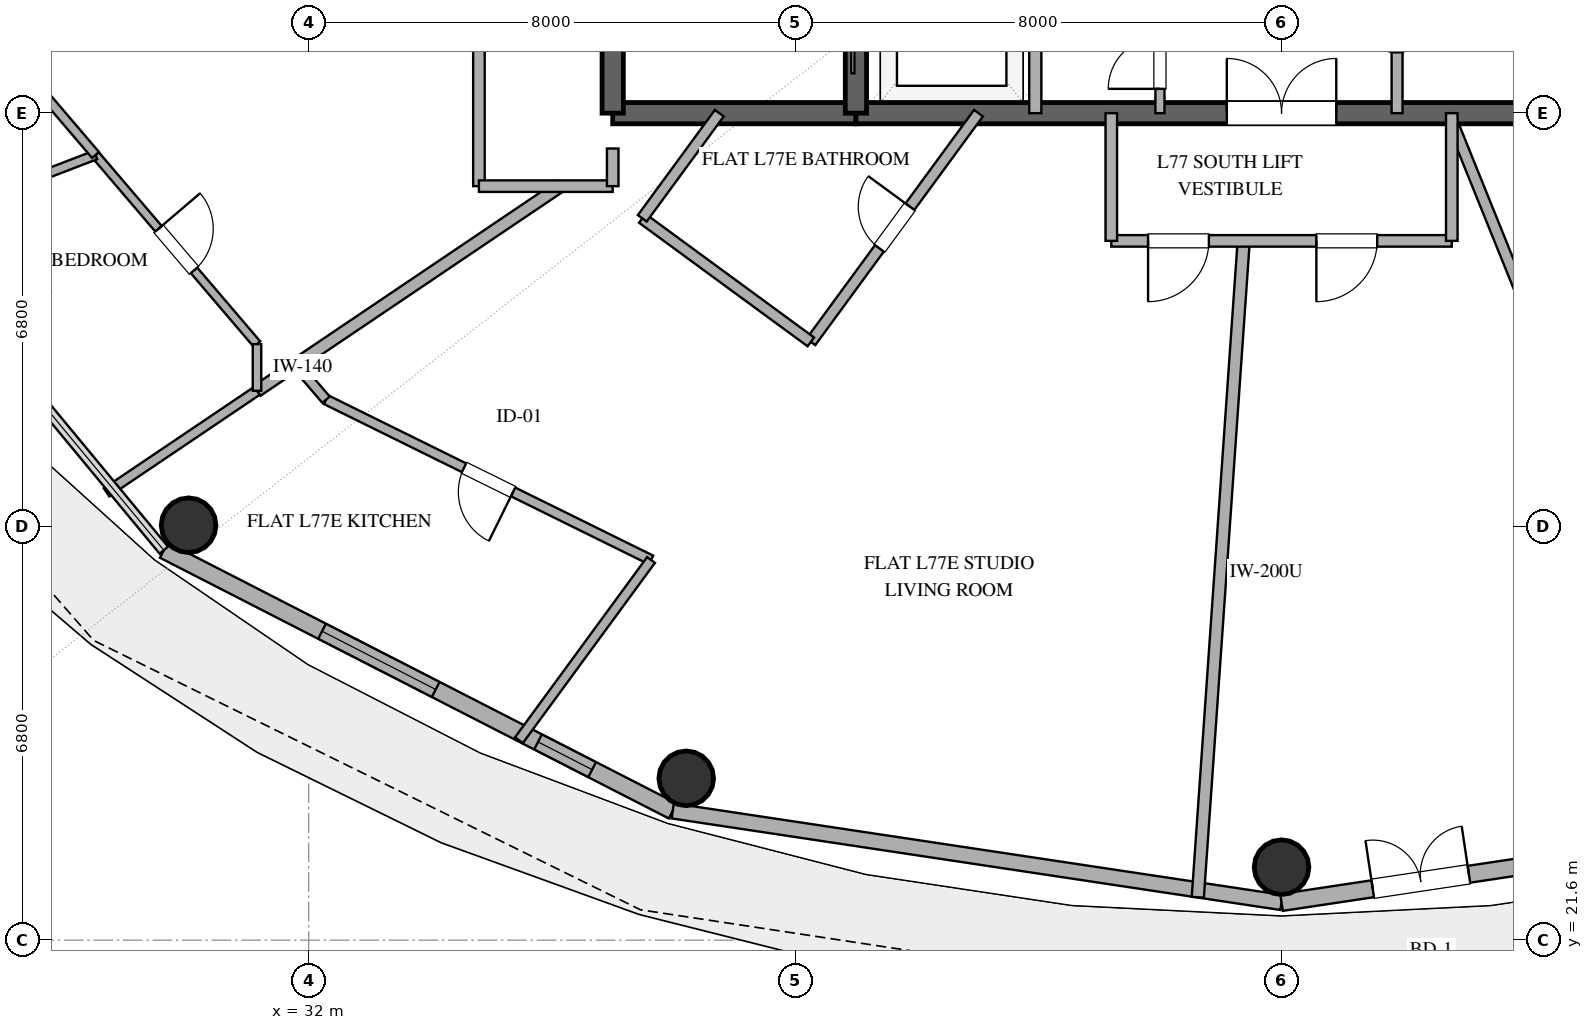
"""IFC4 building model, lengths in metres.
Left out: names, types, materials, properties, quantities, classifications, styles, units other than length and angle.
Written with IfcOpenShell. Run it as: python <this file> out.ifc"""

import sys

from ifc_helpers import new_model, si_unit, direction, frame, frame_2d, origin, origin_2d, place, context, subcontext, project, spatial, rectangle, hollow_circle, extrude, element, fill, save


model = new_model("IFC4")
c1 = context("Model", 3, precision=1e-05, world=origin(), true_north=direction((0.0, 1.0)))
c2 = subcontext(c1, "Body", "Model", "MODEL_VIEW")
j1 = project(units=[si_unit("LENGTHUNIT", "METRE"), si_unit("PLANEANGLEUNIT", "RADIAN")], contexts=[c1])
p1 = place(None, origin())
s1 = spatial("IfcSite", under=j1, at=p1, CompositionType="ELEMENT")
p2 = place(p1, origin())
s2 = spatial("IfcBuilding", under=s1, at=p2, CompositionType="ELEMENT")
p3 = place(p2, frame((0.0, 0.0, 298.2)))
s3 = spatial("IfcBuildingStorey", under=s2, at=p3, CompositionType="ELEMENT", Elevation=298.2)
p4 = place(p3, frame((37.0, 35.2, 0.0), z_axis=(0.0, 0.0, 1.0), x_axis=(1.0, 0.0, 0.0)))
e1 = element("IfcWall", 1, at=p4, inside=s3, PredefinedType="SHEAR", context=c2, shape_type="SweptSolid", body=[
    extrude(rectangle(XDim=4.0, YDim=0.35, at=frame_2d((2.0, 0.0))), origin(), (0.0, 0.0, 1.0), 3.37),
])
p5 = place(p3, frame((41.0, 35.2, 0.0), z_axis=(0.0, 0.0, 1.0), x_axis=(1.0, 0.0, 0.0)))
e2 = element("IfcWall", 2, at=p5, inside=s3, PredefinedType="SHEAR", context=c2, shape_type="SweptSolid", body=[
    extrude(rectangle(XDim=14.0, YDim=0.35, at=frame_2d((7.0, 0.0))), origin(), (0.0, 0.0, 1.0), 3.37),
])
p6 = place(p5, frame((6.1, 0.0, 0.0)))
e3 = element("IfcOpeningElement", 3, at=p6, cuts=e2, PredefinedType="OPENING", context=c2, shape_type="SweptSolid", body=[
    extrude(rectangle(XDim=1.8, YDim=2.25, at=frame_2d((0.9, 1.125))), frame((0.0, 0.185, 0.0), z_axis=(0.0, -1.0, 0.0), x_axis=(1.0, 0.0, 0.0)), (0.0, 0.0, 1.0), 0.37),
])
p7 = place(p3, frame((37.0, 35.2, 0.0), z_axis=(0.0, 0.0, 1.0), x_axis=(0.0, 1.0, 0.0)))
e4 = element("IfcWall", 4, at=p7, inside=s3, PredefinedType="SHEAR", context=c2, shape_type="SweptSolid", body=[
    extrude(rectangle(XDim=13.6, YDim=0.35, at=frame_2d((6.8, 0.0))), origin(), (0.0, 0.0, 1.0), 3.37),
])
p8 = place(p7, frame((1.5, 0.0, 0.0)))
e5 = element("IfcOpeningElement", 5, at=p8, cuts=e4, PredefinedType="OPENING", context=c2, shape_type="SweptSolid", body=[
    extrude(rectangle(XDim=1.2, YDim=2.15, at=frame_2d((0.6, 1.075))), frame((0.0, 0.185, 0.0), z_axis=(0.0, -1.0, 0.0), x_axis=(1.0, 0.0, 0.0)), (0.0, 0.0, 1.0), 0.37),
])
p9 = place(p3, frame((41.0, 35.2, 0.0), z_axis=(0.0, 0.0, 1.0), x_axis=(0.0, 1.0, 0.0)))
e6 = element("IfcWall", 6, at=p9, inside=s3, PredefinedType="SHEAR", context=c2, shape_type="SweptSolid", body=[
    extrude(rectangle(XDim=13.6, YDim=0.35, at=frame_2d((6.8, 0.0))), origin(), (0.0, 0.0, 1.0), 3.37),
])
p10 = place(p9, frame((1.15, 0.0, 0.0)))
e7 = element("IfcOpeningElement", 7, at=p10, cuts=e6, PredefinedType="OPENING", context=c2, shape_type="SweptSolid", body=[
    extrude(rectangle(XDim=1.1, YDim=2.2, at=frame_2d((0.55, 1.1))), frame((0.0, 0.185, 0.0), z_axis=(0.0, -1.0, 0.0), x_axis=(1.0, 0.0, 0.0)), (0.0, 0.0, 1.0), 0.37),
])
for number, where, z_axis, x_axis in (
    (8, (30.025, 28.424, 0.0), (0.0, 0.0, 1.0), (1.0, 0.0, 0.0)),
    (9, (38.209, 24.261, 0.0), (0.0, 0.0, 1.0), (1.0, 0.0, 0.0)),
    (10, (48.0, 22.8, 0.0), (0.0, 0.0, 1.0), (1.0, 0.0, 0.0)),
):
    element("IfcColumn", number, at=place(p3, frame(where, z_axis=z_axis, x_axis=x_axis)), inside=s3, PredefinedType="COLUMN", context=c2, shape_type="SweptSolid", body=[
        extrude(hollow_circle(Radius=0.45, WallThickness=0.025, at=origin_2d()), origin(), (0.0, 0.0, 1.0), 3.37),
    ])
p11 = place(p3, frame((29.617, 28.013, 0.0), z_axis=(0.0, 0.0, 1.0), x_axis=(0.890007394051, -0.455946091699, 0.0)))
e11 = element("IfcWall", 11, at=p11, inside=s3, PredefinedType="SOLIDWALL", context=c2, shape_type="SweptSolid", body=[
    extrude(rectangle(XDim=9.404, YDim=0.28, at=frame_2d((4.702, 0.0))), origin(), (0.0, 0.0, 1.0), 3.37),
])
p12 = place(p11, frame((2.924, 0.0, 0.85)))
e12 = element("IfcOpeningElement", 12, at=p12, cuts=e11, PredefinedType="OPENING", context=c2, shape_type="SweptSolid", body=[
    extrude(rectangle(XDim=2.1, YDim=2.2, at=frame_2d((1.05, 1.1))), frame((0.0, 0.15, 0.0), z_axis=(0.0, -1.0, 0.0), x_axis=(1.0, 0.0, 0.0)), (0.0, 0.0, 1.0), 0.3),
])
p13 = place(p11, frame((6.915, 0.0, 0.85)))
e13 = element("IfcOpeningElement", 13, at=p13, cuts=e11, PredefinedType="OPENING", context=c2, shape_type="SweptSolid", body=[
    extrude(rectangle(XDim=1.0, YDim=1.8, at=frame_2d((0.5, 0.9))), frame((0.0, 0.15, 0.0), z_axis=(0.0, -1.0, 0.0), x_axis=(1.0, 0.0, 0.0)), (0.0, 0.0, 1.0), 0.3),
])
p14 = place(p3, frame((37.987, 23.726, 0.0), z_axis=(0.0, 0.0, 1.0), x_axis=(0.988882522213, -0.148698881169, 0.0)))
e14 = element("IfcWall", 14, at=p14, inside=s3, PredefinedType="SOLIDWALL", context=c2, shape_type="SweptSolid", body=[
    extrude(rectangle(XDim=10.125, YDim=0.25, at=frame_2d((5.062, 0.0))), origin(), (0.0, 0.0, 1.0), 3.37),
])
p15 = place(p3, frame((48.0, 22.22, 0.0), z_axis=(0.0, 0.0, 1.0), x_axis=(0.988882522213, 0.148698881169, 0.0)))
e15 = element("IfcWall", 15, at=p15, inside=s3, PredefinedType="SOLIDWALL", context=c2, shape_type="SweptSolid", body=[
    extrude(rectangle(XDim=10.125, YDim=0.28, at=frame_2d((5.062, 0.0))), origin(), (0.0, 0.0, 1.0), 3.37),
])
p16 = place(p15, frame((1.516, 0.0, 0.0)))
e16 = element("IfcOpeningElement", 16, at=p16, cuts=e15, PredefinedType="OPENING", context=c2, shape_type="SweptSolid", body=[
    extrude(rectangle(XDim=1.6, YDim=2.25, at=frame_2d((0.8, 1.125))), frame((0.0, 0.15, 0.0), z_axis=(0.0, -1.0, 0.0), x_axis=(1.0, 0.0, 0.0)), (0.0, 0.0, 1.0), 0.3),
])
p17 = place(p15, frame((6.169, 0.0, 0.85)))
e17 = element("IfcOpeningElement", 17, at=p17, cuts=e15, PredefinedType="OPENING", context=c2, shape_type="SweptSolid", body=[
    extrude(rectangle(XDim=1.5, YDim=2.0, at=frame_2d((0.75, 1.0))), frame((0.0, 0.15, 0.0), z_axis=(0.0, -1.0, 0.0), x_axis=(1.0, 0.0, 0.0)), (0.0, 0.0, 1.0), 0.3),
])
p18 = place(p3, frame((43.95, 35.2, 0.0), z_axis=(0.0, 0.0, 1.0), x_axis=(0.0, 1.0, 0.0)))
e18 = element("IfcWall", 18, at=p18, inside=s3, PredefinedType="SOLIDWALL", context=c2, shape_type="SweptSolid", body=[
    extrude(rectangle(XDim=3.2, YDim=0.2, at=frame_2d((1.6, 0.0))), origin(), (0.0, 0.0, 1.0), 2.73),
])
p19 = place(p3, frame((46.0, 35.2, 0.0), z_axis=(0.0, 0.0, 1.0), x_axis=(0.0, 1.0, 0.0)))
e19 = element("IfcWall", 19, at=p19, inside=s3, PredefinedType="PARTITIONING", context=c2, shape_type="SweptSolid", body=[
    extrude(rectangle(XDim=3.2, YDim=0.15, at=frame_2d((1.6, 0.0))), origin(), (0.0, 0.0, 1.0), 2.73),
])
p20 = place(p19, frame((0.4, 0.0, 0.0)))
e20 = element("IfcOpeningElement", 20, at=p20, cuts=e19, PredefinedType="OPENING", context=c2, shape_type="SweptSolid", body=[
    extrude(rectangle(XDim=0.85, YDim=2.15, at=frame_2d((0.425, 1.075))), frame((0.0, 0.085, 0.0), z_axis=(0.0, -1.0, 0.0), x_axis=(1.0, 0.0, 0.0)), (0.0, 0.0, 1.0), 0.17),
])
p21 = place(p19, frame((1.85, 0.0, 0.0)))
e21 = element("IfcOpeningElement", 21, at=p21, cuts=e19, PredefinedType="OPENING", context=c2, shape_type="SweptSolid", body=[
    extrude(rectangle(XDim=0.85, YDim=2.15, at=frame_2d((0.425, 1.075))), frame((0.0, 0.085, 0.0), z_axis=(0.0, -1.0, 0.0), x_axis=(1.0, 0.0, 0.0)), (0.0, 0.0, 1.0), 0.17),
])
p22 = place(p3, frame((49.9, 35.2, 0.0), z_axis=(0.0, 0.0, 1.0), x_axis=(0.0, 1.0, 0.0)))
e22 = element("IfcWall", 22, at=p22, inside=s3, PredefinedType="PLUMBINGWALL", context=c2, shape_type="SweptSolid", body=[
    extrude(rectangle(XDim=3.0, YDim=0.18, at=frame_2d((1.5, 0.0))), origin(), (0.0, 0.0, 1.0), 2.73),
])
p23 = place(p22, frame((1.0, 0.0, 0.0)))
e23 = element("IfcOpeningElement", 23, at=p23, cuts=e22, PredefinedType="OPENING", context=c2, shape_type="SweptSolid", body=[
    extrude(rectangle(XDim=0.9, YDim=2.1, at=frame_2d((0.45, 1.05))), frame((0.0, 0.1, 0.0), z_axis=(0.0, -1.0, 0.0), x_axis=(1.0, 0.0, 0.0)), (0.0, 0.0, 1.0), 0.2),
])
p24 = place(p3, frame((47.378, 33.1, 0.0), z_axis=(0.0, 0.0, 1.0), x_axis=(-0.069765360577, -0.997563428792, 0.0)))
e24 = element("IfcWall", 24, at=p24, inside=s3, PredefinedType="PARTITIONING", context=c2, shape_type="SweptSolid", body=[
    extrude(rectangle(XDim=10.82, YDim=0.2, at=frame_2d((5.41, 0.0))), origin(), (0.0, 0.0, 1.0), 2.73),
])
p25 = place(p3, frame((34.8, 34.0, 0.0), z_axis=(0.0, 0.0, 1.0), x_axis=(0.0, 1.0, 0.0)))
e25 = element("IfcWall", 25, at=p25, inside=s3, PredefinedType="PARTITIONING", context=c2, shape_type="SweptSolid", body=[
    extrude(rectangle(XDim=12.323, YDim=0.19, at=frame_2d((6.161, 0.0))), origin(), (0.0, 0.0, 1.0), 2.73),
])
p26 = place(p25, frame((4.849, 0.0, 0.0)))
e26 = element("IfcOpeningElement", 26, at=p26, cuts=e25, PredefinedType="OPENING", context=c2, shape_type="SweptSolid", body=[
    extrude(rectangle(XDim=1.0, YDim=2.2, at=frame_2d((0.5, 1.1))), frame((0.0, 0.105, 0.0), z_axis=(0.0, -1.0, 0.0), x_axis=(1.0, 0.0, 0.0)), (0.0, 0.0, 1.0), 0.21),
])
p27 = place(p3, frame((50.8, 35.07, 0.0), z_axis=(0.0, 0.0, 1.0), x_axis=(0.374600990238, -0.927186118378, 0.0)))
e27 = element("IfcWall", 27, at=p27, inside=s3, PredefinedType="PLUMBINGWALL", context=c2, shape_type="SweptSolid", body=[
    extrude(rectangle(XDim=7.901, YDim=0.18, at=frame_2d((3.95, 0.0))), origin(), (0.0, 0.0, 1.0), 2.73),
])
p28 = place(p3, frame((37.63, 27.852, 0.0), z_axis=(0.0, 0.0, 1.0), x_axis=(-0.896847493932, 0.442339883605, 0.0)))
e28 = element("IfcWall", 28, at=p28, inside=s3, PredefinedType="PLUMBINGWALL", context=c2, shape_type="SweptSolid", body=[
    extrude(rectangle(XDim=5.959, YDim=0.16, at=frame_2d((2.979, 0.0))), origin(), (0.0, 0.0, 1.0), 2.73),
])
p29 = place(p28, frame((2.53, 0.0, 0.0)))
e29 = element("IfcOpeningElement", 29, at=p29, cuts=e28, PredefinedType="OPENING", context=c2, shape_type="SweptSolid", body=[
    extrude(rectangle(XDim=0.9, YDim=2.1, at=frame_2d((0.45, 1.05))), frame((0.0, 0.09, 0.0), z_axis=(0.0, -1.0, 0.0), x_axis=(1.0, 0.0, 0.0)), (0.0, 0.0, 1.0), 0.18),
])
p30 = place(p3, frame((31.15, 30.635, 0.0), z_axis=(0.0, 0.0, 1.0), x_axis=(0.829036266652, 0.559194839546, 0.0)))
e30 = element("IfcWall", 30, at=p30, inside=s3, PredefinedType="PARTITIONING", context=c2, shape_type="SweptSolid", body=[
    extrude(rectangle(XDim=6.019, YDim=0.2, at=frame_2d((3.009, 0.0))), origin(), (0.0, 0.0, 1.0), 2.73),
])
p31 = place(p3, frame((40.259, 31.439, 0.0), z_axis=(0.0, 0.0, 1.0), x_axis=(0.591168457908, 0.806548110391, 0.0)))
e31 = element("IfcWall", 31, at=p31, inside=s3, PredefinedType="PLUMBINGWALL", context=c2, shape_type="SweptSolid", body=[
    extrude(rectangle(XDim=4.663, YDim=0.18, at=frame_2d((2.332, 0.0))), origin(), (0.0, 0.0, 1.0), 2.73),
])
p32 = place(p31, frame((1.907, 0.0, 0.0)))
e32 = element("IfcOpeningElement", 32, at=p32, cuts=e31, PredefinedType="OPENING", context=c2, shape_type="SweptSolid", body=[
    extrude(rectangle(XDim=0.85, YDim=2.1, at=frame_2d((0.425, 1.05))), frame((0.0, 0.1, 0.0), z_axis=(0.0, -1.0, 0.0), x_axis=(1.0, 0.0, 0.0)), (0.0, 0.0, 1.0), 0.2),
])
p33 = place(p3, frame((28.494, 34.512, 0.0), z_axis=(0.0, 0.0, 1.0), x_axis=(0.649192484668, -0.760624163336, 0.0)))
e33 = element("IfcWall", 33, at=p33, inside=s3, PredefinedType="PARTITIONING", context=c2, shape_type="SweptSolid", body=[
    extrude(rectangle(XDim=4.091, YDim=0.14, at=frame_2d((2.045, 0.0))), origin(), (0.0, 0.0, 1.0), 2.73),
])
p34 = place(p33, frame((1.595, 0.0, 0.0)))
e34 = element("IfcOpeningElement", 34, at=p34, cuts=e33, PredefinedType="OPENING", context=c2, shape_type="SweptSolid", body=[
    extrude(rectangle(XDim=0.9, YDim=2.1, at=frame_2d((0.45, 1.05))), frame((0.0, 0.08, 0.0), z_axis=(0.0, -1.0, 0.0), x_axis=(1.0, 0.0, 0.0)), (0.0, 0.0, 1.0), 0.16),
])
p35 = place(p3, frame((35.458, 24.888, 0.0), z_axis=(0.0, 0.0, 1.0), x_axis=(0.591118806012, 0.806584500954, 0.0)))
e35 = element("IfcWall", 35, at=p35, inside=s3, PredefinedType="PLUMBINGWALL", context=c2, shape_type="SweptSolid", body=[
    extrude(rectangle(XDim=3.675, YDim=0.16, at=frame_2d((1.837, 0.0))), origin(), (0.0, 0.0, 1.0), 2.73),
])
p36 = place(p3, frame((28.494, 34.512, 0.0), z_axis=(0.0, 0.0, 1.0), x_axis=(-0.933587977353, -0.358348278274, 0.0)))
e36 = element("IfcWall", 36, at=p36, inside=s3, PredefinedType="PARTITIONING", context=c2, shape_type="SweptSolid", body=[
    extrude(rectangle(XDim=3.58, YDim=0.15, at=frame_2d((1.79, 0.0))), origin(), (0.0, 0.0, 1.0), 2.73),
])
p37 = place(p3, frame((50.8, 33.1, 0.0), z_axis=(0.0, 0.0, 1.0), x_axis=(-1.0, 0.0, 0.0)))
e37 = element("IfcWall", 37, at=p37, inside=s3, PredefinedType="PARTITIONING", context=c2, shape_type="SweptSolid", body=[
    extrude(rectangle(XDim=5.6, YDim=0.19, at=frame_2d((2.8, 0.0))), origin(), (0.0, 0.0, 1.0), 2.73),
])
p38 = place(p37, frame((1.227, 0.0, 0.0)))
e38 = element("IfcOpeningElement", 38, at=p38, cuts=e37, PredefinedType="OPENING", context=c2, shape_type="SweptSolid", body=[
    extrude(rectangle(XDim=1.0, YDim=2.2, at=frame_2d((0.5, 1.1))), frame((0.0, 0.105, 0.0), z_axis=(0.0, -1.0, 0.0), x_axis=(1.0, 0.0, 0.0)), (0.0, 0.0, 1.0), 0.21),
])
p39 = place(p37, frame((3.995, 0.0, 0.0)))
e39 = element("IfcOpeningElement", 39, at=p39, cuts=e37, PredefinedType="OPENING", context=c2, shape_type="SweptSolid", body=[
    extrude(rectangle(XDim=1.0, YDim=2.2, at=frame_2d((0.5, 1.1))), frame((0.0, 0.105, 0.0), z_axis=(0.0, -1.0, 0.0), x_axis=(1.0, 0.0, 0.0)), (0.0, 0.0, 1.0), 0.21),
])
p40 = place(p3, frame((37.486, 33.471, 0.0), z_axis=(0.0, 0.0, 1.0), x_axis=(0.80655624282, -0.59115736244, 0.0)))
e40 = element("IfcWall", 40, at=p40, inside=s3, PredefinedType="PLUMBINGWALL", context=c2, shape_type="SweptSolid", body=[
    extrude(rectangle(XDim=3.438, YDim=0.18, at=frame_2d((1.719, 0.0))), origin(), (0.0, 0.0, 1.0), 2.73),
])
p41 = place(p3, frame((31.15, 30.635, 0.0), z_axis=(0.0, 0.0, 1.0), x_axis=(-0.82904391661, -0.559183497907, 0.0)))
e41 = element("IfcWall", 41, at=p41, inside=s3, PredefinedType="PLUMBINGWALL", context=c2, shape_type="SweptSolid", body=[
    extrude(rectangle(XDim=2.986, YDim=0.16, at=frame_2d((1.493, 0.0))), origin(), (0.0, 0.0, 1.0), 2.73),
])
p42 = place(p3, frame((38.754, 35.2, 0.0), z_axis=(0.0, 0.0, 1.0), x_axis=(-0.591255046212, -0.806484637379, 0.0)))
e42 = element("IfcWall", 42, at=p42, inside=s3, PredefinedType="PLUMBINGWALL", context=c2, shape_type="SweptSolid", body=[
    extrude(rectangle(XDim=2.144, YDim=0.18, at=frame_2d((1.072, 0.0))), origin(), (0.0, 0.0, 1.0), 2.73),
])
for number, where, z_axis, x_axis in (
    (43, (45.2, 33.1, 0.0), (0.0, 0.0, 1.0), (0.0, 1.0, 0.0)),
    (44, (50.8, 35.2, 0.0), (0.0, 0.0, 1.0), (0.0, -1.0, 0.0)),
):
    element("IfcWall", number, at=place(p3, frame(where, z_axis=z_axis, x_axis=x_axis)), inside=s3, PredefinedType="PARTITIONING", context=c2, shape_type="SweptSolid", body=[
        extrude(rectangle(XDim=2.1, YDim=0.19, at=frame_2d((1.05, 0.0))), origin(), (0.0, 0.0, 1.0), 2.73),
    ])
p43 = place(p3, frame((27.519, 35.655, 0.0), z_axis=(0.0, 0.0, 1.0), x_axis=(0.649250915383, -0.760574288859, 0.0)))
e45 = element("IfcWall", 45, at=p43, inside=s3, PredefinedType="PARTITIONING", context=c2, shape_type="SweptSolid", body=[
    extrude(rectangle(XDim=1.502, YDim=0.15, at=frame_2d((0.751, 0.0))), origin(), (0.0, 0.0, 1.0), 2.73),
])
p44 = place(p3, frame((37.0, 34.0, 0.0), z_axis=(0.0, 0.0, 1.0), x_axis=(-1.0, 0.0, 0.0)))
e46 = element("IfcWall", 46, at=p44, inside=s3, PredefinedType="PARTITIONING", context=c2, shape_type="SweptSolid", body=[
    extrude(rectangle(XDim=2.2, YDim=0.19, at=frame_2d((1.1, 0.0))), origin(), (0.0, 0.0, 1.0), 2.73),
])
p45 = place(p3, frame((31.15, 31.401, 0.0), z_axis=(0.0, 0.0, 1.0), x_axis=(0.0, -1.0, 0.0)))
e47 = element("IfcWall", 47, at=p45, inside=s3, PredefinedType="PARTITIONING", context=c2, shape_type="SweptSolid", body=[
    extrude(rectangle(XDim=0.767, YDim=0.14, at=frame_2d((0.383, 0.0))), origin(), (0.0, 0.0, 1.0), 2.73),
])
p46 = place(p3, frame((32.286, 30.488, 0.0), z_axis=(0.0, 0.0, 1.0), x_axis=(-0.651714881855, 0.758464048435, 0.0)))
e48 = element("IfcWall", 48, at=p46, inside=s3, PredefinedType="PLUMBINGWALL", context=c2, shape_type="SweptSolid", body=[
    extrude(rectangle(XDim=0.761, YDim=0.16, at=frame_2d((0.381, 0.0))), origin(), (0.0, 0.0, 1.0), 2.73),
])
p47 = place(p3, frame((37.0, 34.619, 0.0), z_axis=(0.0, 0.0, 1.0), x_axis=(0.0, -1.0, 0.0)))
e49 = element("IfcWall", 49, at=p47, inside=s3, PredefinedType="PARTITIONING", context=c2, shape_type="SweptSolid", body=[
    extrude(rectangle(XDim=0.619, YDim=0.19, at=frame_2d((0.31, 0.0))), origin(), (0.0, 0.0, 1.0), 2.73),
])
p48 = place(p12, origin())
e50 = element("IfcWindow", 50, at=p48, inside=s3, PartitioningType="SINGLE_PANEL", PredefinedType="WINDOW", context=c2, shape_type="SweptSolid", body=[
    extrude(rectangle(XDim=2.1, YDim=2.2, at=frame_2d((1.05, 1.1))), frame((0.0, 0.03, 0.0), z_axis=(0.0, -1.0, 0.0), x_axis=(1.0, 0.0, 0.0)), (0.0, 0.0, 1.0), 0.06),
])
fill(e12, e50)
p49 = place(p13, origin())
e51 = element("IfcWindow", 51, at=p49, inside=s3, PartitioningType="SINGLE_PANEL", PredefinedType="WINDOW", context=c2, shape_type="SweptSolid", body=[
    extrude(rectangle(XDim=1.0, YDim=1.8, at=frame_2d((0.5, 0.9))), frame((0.0, 0.03, 0.0), z_axis=(0.0, -1.0, 0.0), x_axis=(1.0, 0.0, 0.0)), (0.0, 0.0, 1.0), 0.06),
])
fill(e13, e51)
p50 = place(p16, origin())
e52 = element("IfcDoor", 52, at=p50, inside=s3, OperationType="DOUBLE_DOOR_SINGLE_SWING", PredefinedType="DOOR", context=c2, shape_type="SweptSolid", body=[
    extrude(rectangle(XDim=1.6, YDim=2.25, at=frame_2d((0.8, 1.125))), frame((0.0, 0.025, 0.0), z_axis=(0.0, -1.0, 0.0), x_axis=(1.0, 0.0, 0.0)), (0.0, 0.0, 1.0), 0.05),
])
fill(e16, e52)
p51 = place(p6, origin())
e53 = element("IfcDoor", 53, at=p51, inside=s3, OperationType="DOUBLE_DOOR_SINGLE_SWING", PredefinedType="DOOR", context=c2, shape_type="SweptSolid", body=[
    extrude(rectangle(XDim=1.8, YDim=2.25, at=frame_2d((0.9, 1.125))), frame((0.0, 0.025, 0.0), z_axis=(0.0, -1.0, 0.0), x_axis=(1.0, 0.0, 0.0)), (0.0, 0.0, 1.0), 0.05),
])
fill(e3, e53)
p52 = place(p20, origin())
e54 = element("IfcDoor", 54, at=p52, inside=s3, OperationType="SINGLE_SWING_LEFT", PredefinedType="DOOR", context=c2, shape_type="SweptSolid", body=[
    extrude(rectangle(XDim=0.85, YDim=2.15, at=frame_2d((0.425, 1.075))), frame((0.0, 0.025, 0.0), z_axis=(0.0, -1.0, 0.0), x_axis=(1.0, 0.0, 0.0)), (0.0, 0.0, 1.0), 0.05),
])
fill(e20, e54)
p53 = place(p29, origin())
e55 = element("IfcDoor", 55, at=p53, inside=s3, OperationType="SINGLE_SWING_LEFT", PredefinedType="DOOR", context=c2, shape_type="SweptSolid", body=[
    extrude(rectangle(XDim=0.9, YDim=2.1, at=frame_2d((0.45, 1.05))), frame((0.0, 0.025, 0.0), z_axis=(0.0, -1.0, 0.0), x_axis=(1.0, 0.0, 0.0)), (0.0, 0.0, 1.0), 0.05),
])
fill(e29, e55)
p54 = place(p32, origin())
e56 = element("IfcDoor", 56, at=p54, inside=s3, OperationType="SINGLE_SWING_RIGHT", PredefinedType="DOOR", context=c2, shape_type="SweptSolid", body=[
    extrude(rectangle(XDim=0.85, YDim=2.1, at=frame_2d((0.425, 1.05))), frame((0.0, 0.025, 0.0), z_axis=(0.0, -1.0, 0.0), x_axis=(1.0, 0.0, 0.0)), (0.0, 0.0, 1.0), 0.05),
])
fill(e32, e56)
p55 = place(p34, origin())
e57 = element("IfcDoor", 57, at=p55, inside=s3, OperationType="SINGLE_SWING_LEFT", PredefinedType="DOOR", context=c2, shape_type="SweptSolid", body=[
    extrude(rectangle(XDim=0.9, YDim=2.1, at=frame_2d((0.45, 1.05))), frame((0.0, 0.025, 0.0), z_axis=(0.0, -1.0, 0.0), x_axis=(1.0, 0.0, 0.0)), (0.0, 0.0, 1.0), 0.05),
])
fill(e34, e57)
p56 = place(p38, origin())
e58 = element("IfcDoor", 58, at=p56, inside=s3, OperationType="SINGLE_SWING_RIGHT", PredefinedType="DOOR", context=c2, shape_type="SweptSolid", body=[
    extrude(rectangle(XDim=1.0, YDim=2.2, at=frame_2d((0.5, 1.1))), frame((0.0, 0.025, 0.0), z_axis=(0.0, -1.0, 0.0), x_axis=(1.0, 0.0, 0.0)), (0.0, 0.0, 1.0), 0.05),
])
fill(e38, e58)
p57 = place(p39, origin())
e59 = element("IfcDoor", 59, at=p57, inside=s3, OperationType="SINGLE_SWING_RIGHT", PredefinedType="DOOR", context=c2, shape_type="SweptSolid", body=[
    extrude(rectangle(XDim=1.0, YDim=2.2, at=frame_2d((0.5, 1.1))), frame((0.0, 0.025, 0.0), z_axis=(0.0, -1.0, 0.0), x_axis=(1.0, 0.0, 0.0)), (0.0, 0.0, 1.0), 0.05),
])
fill(e39, e59)
save(model, sys.argv[1])
